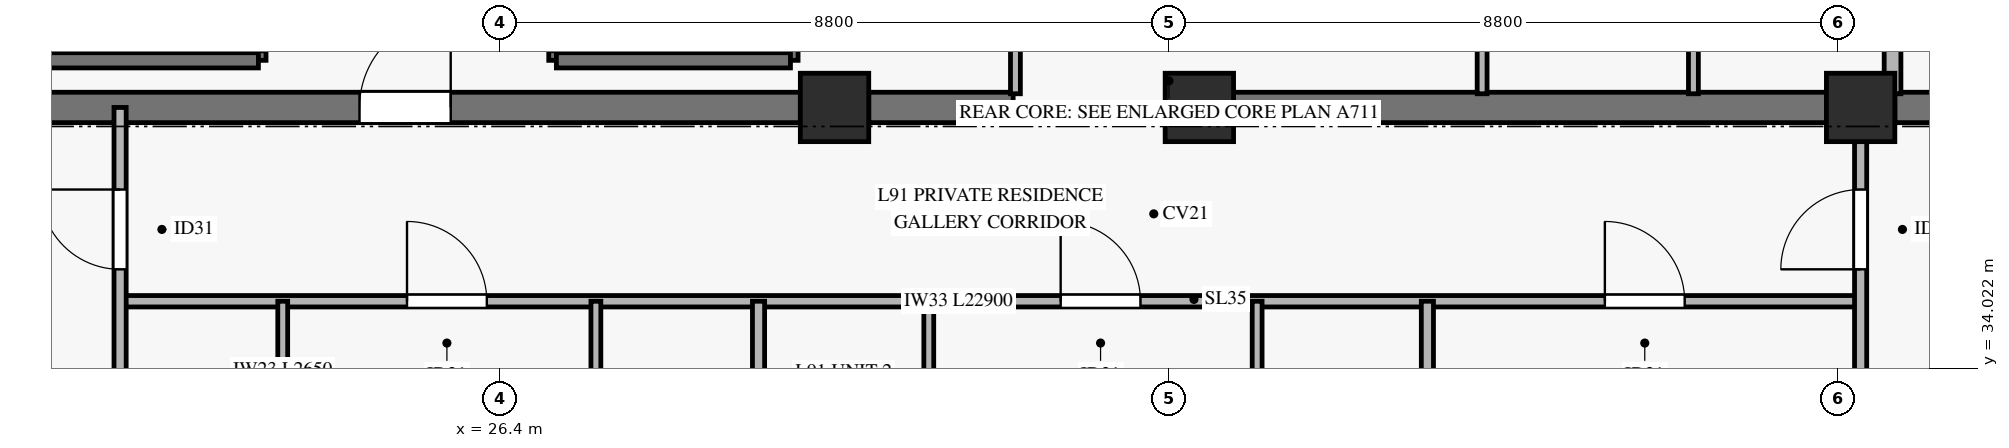
"""IFC4 building model, lengths in metres.
Left out: names, types, materials, properties, quantities, classifications, styles, units other than length and angle.
Written with IfcOpenShell. Run it as: python <this file> out.ifc"""

import sys

from ifc_helpers import new_model, si_unit, direction, frame, frame_2d, origin, origin_2d, place, context, subcontext, project, spatial, rectangle, extrude, source, transform, mapped, element, fill, save


model = new_model("IFC4")
c1 = context("Model", 3, precision=1e-05, world=origin(), true_north=direction((0.0, 1.0)))
c2 = subcontext(c1, "Body", "Model", "MODEL_VIEW")
j1 = project(units=[si_unit("LENGTHUNIT", "METRE"), si_unit("PLANEANGLEUNIT", "RADIAN")], contexts=[c1])
p1 = place(None, origin())
s1 = spatial("IfcSite", under=j1, at=p1, CompositionType="ELEMENT")
p2 = place(p1, origin())
s2 = spatial("IfcBuilding", under=s1, at=p2, CompositionType="ELEMENT")
p3 = place(p2, frame((0.0, 0.0, 349.3)))
s3 = spatial("IfcBuildingStorey", under=s2, at=p3, CompositionType="ELEMENT", Elevation=349.3)
m1 = source(origin(), c2, "Body", "SweptSolid", [
    extrude(rectangle(XDim=0.9, YDim=0.9, at=origin_2d()), origin(), (0.0, 0.0, 1.0), 3.08),
])
for number, where, z_axis, x_axis in (
    (1, (30.8, 37.45, 0.0), (0.0, 0.0, 1.0), (1.0, 0.0, 0.0)),
    (2, (35.6, 37.45, 0.0), (0.0, 0.0, 1.0), (1.0, 0.0, 0.0)),
    (3, (44.3, 37.45, 0.0), (0.0, 0.0, 1.0), (1.0, 0.0, 0.0)),
):
    element("IfcColumn", number, at=place(p3, frame(where, z_axis=z_axis, x_axis=x_axis)), inside=s3, PredefinedType="PILASTER", context=c2, shape_type="MappedRepresentation", body=[
        mapped(m1, transform((0.0, 0.0, 0.0), x_axis=(1.0, 0.0, 0.0), y_axis=(0.0, 1.0, 0.0), z_axis=(0.0, 0.0, 1.0), scale=1.0)),
    ])
p4 = place(p3, frame((20.3, 37.45, 0.0), z_axis=(0.0, 0.0, 1.0), x_axis=(1.0, 0.0, 0.0)))
e4 = element("IfcWall", 4, at=p4, inside=s3, PredefinedType="SHEAR", context=c2, shape_type="SweptSolid", body=[
    extrude(rectangle(XDim=10.05, YDim=0.4, at=frame_2d((5.025, 0.0))), origin(), (0.0, 0.0, 1.0), 3.08),
])
p5 = place(p4, frame((4.25, 0.0, 0.0)))
e5 = element("IfcOpeningElement", 5, at=p5, cuts=e4, PredefinedType="OPENING", context=c2, shape_type="SweptSolid", body=[
    extrude(rectangle(XDim=1.2, YDim=2.15, at=frame_2d((0.6, 1.075))), frame((0.0, 0.21, 0.0), z_axis=(0.0, -1.0, 0.0), x_axis=(1.0, 0.0, 0.0)), (0.0, 0.0, 1.0), 0.42),
])
p6 = place(p3, frame((31.25, 37.45, 0.0), z_axis=(0.0, 0.0, 1.0), x_axis=(1.0, 0.0, 0.0)))
e6 = element("IfcWall", 6, at=p6, inside=s3, PredefinedType="SHEAR", context=c2, shape_type="SweptSolid", body=[
    extrude(rectangle(XDim=1.9, YDim=0.4, at=frame_2d((0.95, 0.0))), origin(), (0.0, 0.0, 1.0), 3.08),
])
p7 = place(p3, frame((36.05, 37.45, 0.0), z_axis=(0.0, 0.0, 1.0), x_axis=(1.0, 0.0, 0.0)))
e7 = element("IfcWall", 7, at=p7, inside=s3, PredefinedType="SHEAR", context=c2, shape_type="SweptSolid", body=[
    extrude(rectangle(XDim=7.8, YDim=0.4, at=frame_2d((3.9, 0.0))), origin(), (0.0, 0.0, 1.0), 3.08),
])
p8 = place(p3, frame((44.75, 37.45, 0.0), z_axis=(0.0, 0.0, 1.0), x_axis=(1.0, 0.0, 0.0)))
e8 = element("IfcWall", 8, at=p8, inside=s3, PredefinedType="SHEAR", context=c2, shape_type="SweptSolid", body=[
    extrude(rectangle(XDim=5.35, YDim=0.4, at=frame_2d((2.675, 0.0))), origin(), (0.0, 0.0, 1.0), 3.08),
])
p9 = place(p8, frame((0.7, 0.0, 0.0)))
e9 = element("IfcOpeningElement", 9, at=p9, cuts=e8, PredefinedType="OPENING", context=c2, shape_type="SweptSolid", body=[
    extrude(rectangle(XDim=1.2, YDim=2.15, at=frame_2d((0.6, 1.075))), frame((0.0, 0.21, 0.0), z_axis=(0.0, -1.0, 0.0), x_axis=(1.0, 0.0, 0.0)), (0.0, 0.0, 1.0), 0.42),
])
p10 = place(p3, frame((23.22, 38.07, 0.0), z_axis=(0.0, 0.0, 1.0), x_axis=(0.0, 1.0, 0.0)))
e10 = element("IfcWall", 10, at=p10, inside=s3, PredefinedType="SOLIDWALL", context=c2, shape_type="SweptSolid", body=[
    extrude(rectangle(XDim=7.25, YDim=0.2, at=frame_2d((3.625, 0.0))), origin(), (0.0, 0.0, 1.0), 3.4),
])
p11 = place(p10, frame((0.11, 0.0, 0.0)))
e11 = element("IfcOpeningElement", 11, at=p11, cuts=e10, PredefinedType="OPENING", context=c2, shape_type="SweptSolid", body=[
    extrude(rectangle(XDim=1.1, YDim=2.15, at=frame_2d((0.55, 1.075))), frame((0.0, 0.11, 0.0), z_axis=(0.0, -1.0, 0.0), x_axis=(1.0, 0.0, 0.0)), (0.0, 0.0, 1.0), 0.22),
])
p12 = place(p3, frame((20.17, 38.07, 0.0), z_axis=(0.0, 0.0, 1.0), x_axis=(1.0, 0.0, 0.0)))
e12 = element("IfcWall", 12, at=p12, inside=s3, PredefinedType="SOLIDWALL", context=c2, shape_type="SweptSolid", body=[
    extrude(rectangle(XDim=3.05, YDim=0.2, at=frame_2d((1.525, 0.0))), origin(), (0.0, 0.0, 1.0), 3.4),
])
p13 = place(p3, frame((27.14, 38.07, 0.0), z_axis=(0.0, 0.0, 1.0), x_axis=(0.0, 1.0, 0.0)))
e13 = element("IfcWall", 13, at=p13, inside=s3, PredefinedType="SOLIDWALL", context=c2, shape_type="SweptSolid", body=[
    extrude(rectangle(XDim=7.25, YDim=0.2, at=frame_2d((3.625, 0.0))), origin(), (0.0, 0.0, 1.0), 3.4),
])
p14 = place(p13, frame((0.11, 0.0, 0.0)))
e14 = element("IfcOpeningElement", 14, at=p14, cuts=e13, PredefinedType="OPENING", context=c2, shape_type="SweptSolid", body=[
    extrude(rectangle(XDim=1.1, YDim=2.15, at=frame_2d((0.55, 1.075))), frame((0.0, 0.11, 0.0), z_axis=(0.0, -1.0, 0.0), x_axis=(1.0, 0.0, 0.0)), (0.0, 0.0, 1.0), 0.22),
])
p15 = place(p3, frame((30.22, 38.07, 0.0), z_axis=(0.0, 0.0, 1.0), x_axis=(0.0, 1.0, 0.0)))
e15 = element("IfcWall", 15, at=p15, inside=s3, PredefinedType="SOLIDWALL", context=c2, shape_type="SweptSolid", body=[
    extrude(rectangle(XDim=7.25, YDim=0.2, at=frame_2d((3.625, 0.0))), origin(), (0.0, 0.0, 1.0), 3.4),
])
p16 = place(p3, frame((27.14, 38.07, 0.0), z_axis=(0.0, 0.0, 1.0), x_axis=(1.0, 0.0, 0.0)))
e16 = element("IfcWall", 16, at=p16, inside=s3, PredefinedType="SOLIDWALL", context=c2, shape_type="SweptSolid", body=[
    extrude(rectangle(XDim=3.08, YDim=0.2, at=frame_2d((1.54, 0.0))), origin(), (0.0, 0.0, 1.0), 3.4),
])
p17 = place(p3, frame((44.72, 37.63, 0.0), z_axis=(0.0, 0.0, 1.0), x_axis=(0.0, 1.0, 0.0)))
e17 = element("IfcWall", 17, at=p17, inside=s3, PredefinedType="SOLIDWALL", context=c2, shape_type="SweptSolid", body=[
    extrude(rectangle(XDim=7.59, YDim=0.22, at=frame_2d((3.795, 0.0))), origin(), (0.0, 0.0, 1.0), 3.08),
])
p18 = place(p3, frame((33.18, 37.63, 0.0), z_axis=(0.0, 0.0, 1.0), x_axis=(0.0, 1.0, 0.0)))
e18 = element("IfcWall", 18, at=p18, inside=s3, PredefinedType="PARTITIONING", context=c2, shape_type="SweptSolid", body=[
    extrude(rectangle(XDim=6.52, YDim=0.13, at=frame_2d((3.26, 0.0))), origin(), (0.0, 0.0, 1.0), 2.22),
])
p19 = place(p18, frame((0.97, 0.0, 0.0)))
e19 = element("IfcOpeningElement", 19, at=p19, cuts=e18, PredefinedType="OPENING", context=c2, shape_type="SweptSolid", body=[
    extrude(rectangle(XDim=0.9, YDim=2.1, at=frame_2d((0.45, 1.05))), frame((0.0, 0.075, 0.0), z_axis=(0.0, -1.0, 0.0), x_axis=(1.0, 0.0, 0.0)), (0.0, 0.0, 1.0), 0.15),
])
p20 = place(p18, frame((3.87, 0.0, 0.0)))
e20 = element("IfcOpeningElement", 20, at=p20, cuts=e18, PredefinedType="OPENING", context=c2, shape_type="SweptSolid", body=[
    extrude(rectangle(XDim=0.9, YDim=2.1, at=frame_2d((0.45, 1.05))), frame((0.0, 0.075, 0.0), z_axis=(0.0, -1.0, 0.0), x_axis=(1.0, 0.0, 0.0)), (0.0, 0.0, 1.0), 0.15),
])
p21 = place(p3, frame((39.32, 37.63, 0.0), z_axis=(0.0, 0.0, 1.0), x_axis=(0.0, 1.0, 0.0)))
e21 = element("IfcWall", 21, at=p21, inside=s3, PredefinedType="PARTITIONING", context=c2, shape_type="SweptSolid", body=[
    extrude(rectangle(XDim=8.74, YDim=0.13, at=frame_2d((4.37, 0.0))), origin(), (0.0, 0.0, 1.0), 3.08),
])
p22 = place(p21, frame((4.89, 0.0, 0.0)))
e22 = element("IfcOpeningElement", 22, at=p22, cuts=e21, PredefinedType="OPENING", context=c2, shape_type="SweptSolid", body=[
    extrude(rectangle(XDim=0.9, YDim=2.1, at=frame_2d((0.45, 1.05))), frame((0.0, 0.075, 0.0), z_axis=(0.0, -1.0, 0.0), x_axis=(1.0, 0.0, 0.0)), (0.0, 0.0, 1.0), 0.15),
])
p23 = place(p3, frame((42.1, 37.63, 0.0), z_axis=(0.0, 0.0, 1.0), x_axis=(0.0, 1.0, 0.0)))
e23 = element("IfcWall", 23, at=p23, inside=s3, PredefinedType="PARTITIONING", context=c2, shape_type="SweptSolid", body=[
    extrude(rectangle(XDim=8.74, YDim=0.13, at=frame_2d((4.37, 0.0))), origin(), (0.0, 0.0, 1.0), 3.08),
])
p24 = place(p23, frame((2.17, 0.0, 0.0)))
e24 = element("IfcOpeningElement", 24, at=p24, cuts=e23, PredefinedType="OPENING", context=c2, shape_type="SweptSolid", body=[
    extrude(rectangle(XDim=0.9, YDim=2.1, at=frame_2d((0.45, 1.05))), frame((0.0, 0.075, 0.0), z_axis=(0.0, -1.0, 0.0), x_axis=(1.0, 0.0, 0.0)), (0.0, 0.0, 1.0), 0.15),
])
p25 = place(p3, frame((21.4, 34.9, 0.0), z_axis=(0.0, 0.0, 1.0), x_axis=(1.0, 0.0, 0.0)))
e25 = element("IfcWall", 25, at=p25, inside=s3, PredefinedType="PARTITIONING", context=c2, shape_type="SweptSolid", body=[
    extrude(rectangle(XDim=22.9, YDim=0.15, at=frame_2d((11.45, 0.0))), origin(), (0.0, 0.0, 1.0), 2.365),
])
p26 = place(p25, frame((3.775, 0.0, 0.0)))
e26 = element("IfcOpeningElement", 26, at=p26, cuts=e25, PredefinedType="OPENING", context=c2, shape_type="SweptSolid", body=[
    extrude(rectangle(XDim=1.05, YDim=2.15, at=frame_2d((0.525, 1.075))), frame((0.0, 0.085, 0.0), z_axis=(0.0, -1.0, 0.0), x_axis=(1.0, 0.0, 0.0)), (0.0, 0.0, 1.0), 0.17),
])
p27 = place(p25, frame((12.375, 0.0, 0.0)))
e27 = element("IfcOpeningElement", 27, at=p27, cuts=e25, PredefinedType="OPENING", context=c2, shape_type="SweptSolid", body=[
    extrude(rectangle(XDim=1.05, YDim=2.15, at=frame_2d((0.525, 1.075))), frame((0.0, 0.085, 0.0), z_axis=(0.0, -1.0, 0.0), x_axis=(1.0, 0.0, 0.0)), (0.0, 0.0, 1.0), 0.17),
])
p28 = place(p25, frame((19.535, 0.0, 0.0)))
e28 = element("IfcOpeningElement", 28, at=p28, cuts=e25, PredefinedType="OPENING", context=c2, shape_type="SweptSolid", body=[
    extrude(rectangle(XDim=1.05, YDim=2.15, at=frame_2d((0.525, 1.075))), frame((0.0, 0.085, 0.0), z_axis=(0.0, -1.0, 0.0), x_axis=(1.0, 0.0, 0.0)), (0.0, 0.0, 1.0), 0.17),
])
p29 = place(p3, frame((21.4, 23.5, 0.0), z_axis=(0.0, 0.0, 1.0), x_axis=(0.0, 1.0, 0.0)))
e29 = element("IfcWall", 29, at=p29, inside=s3, PredefinedType="PARTITIONING", context=c2, shape_type="SweptSolid", body=[
    extrude(rectangle(XDim=13.95, YDim=0.16, at=frame_2d((6.975, 0.0))), origin(), (0.0, 0.0, 1.0), 2.665),
])
p30 = place(p29, frame((11.82, 0.0, 0.0)))
e30 = element("IfcOpeningElement", 30, at=p30, cuts=e29, PredefinedType="OPENING", context=c2, shape_type="SweptSolid", body=[
    extrude(rectangle(XDim=1.05, YDim=2.15, at=frame_2d((0.525, 1.075))), frame((0.0, 0.09, 0.0), z_axis=(0.0, -1.0, 0.0), x_axis=(1.0, 0.0, 0.0)), (0.0, 0.0, 1.0), 0.18),
])
for number, where, z_axis, x_axis in (
    (31, (29.8, 23.5, 0.0), (0.0, 0.0, 1.0), (0.0, 1.0, 0.0)),
    (32, (38.6, 23.5, 0.0), (0.0, 0.0, 1.0), (0.0, 1.0, 0.0)),
):
    element("IfcWall", number, at=place(p3, frame(where, z_axis=z_axis, x_axis=x_axis)), inside=s3, PredefinedType="PARTITIONING", context=c2, shape_type="SweptSolid", body=[
        extrude(rectangle(XDim=11.4, YDim=0.16, at=frame_2d((5.7, 0.0))), origin(), (0.0, 0.0, 1.0), 2.665),
    ])
p31 = place(p3, frame((44.3, 23.5, 0.0), z_axis=(0.0, 0.0, 1.0), x_axis=(0.0, 1.0, 0.0)))
e33 = element("IfcWall", 33, at=p31, inside=s3, PredefinedType="PARTITIONING", context=c2, shape_type="SweptSolid", body=[
    extrude(rectangle(XDim=13.95, YDim=0.16, at=frame_2d((6.975, 0.0))), origin(), (0.0, 0.0, 1.0), 2.365),
])
p32 = place(p31, frame((11.82, 0.0, 0.0)))
e34 = element("IfcOpeningElement", 34, at=p32, cuts=e33, PredefinedType="OPENING", context=c2, shape_type="SweptSolid", body=[
    extrude(rectangle(XDim=1.05, YDim=2.15, at=frame_2d((0.525, 1.075))), frame((0.0, 0.09, 0.0), z_axis=(0.0, -1.0, 0.0), x_axis=(1.0, 0.0, 0.0)), (0.0, 0.0, 1.0), 0.18),
])
p33 = place(p3, frame((23.54, 32.25, 0.0), z_axis=(0.0, 0.0, 1.0), x_axis=(0.0, 1.0, 0.0)))
e35 = element("IfcWall", 35, at=p33, inside=s3, PredefinedType="PARTITIONING", context=c2, shape_type="SweptSolid", body=[
    extrude(rectangle(XDim=2.65, YDim=0.13, at=frame_2d((1.325, 0.0))), origin(), (0.0, 0.0, 1.0), 2.665),
])
p34 = place(p3, frame((27.66, 32.25, 0.0), z_axis=(0.0, 0.0, 1.0), x_axis=(0.0, 1.0, 0.0)))
e36 = element("IfcWall", 36, at=p34, inside=s3, PredefinedType="PARTITIONING", context=c2, shape_type="SweptSolid", body=[
    extrude(rectangle(XDim=2.65, YDim=0.13, at=frame_2d((1.325, 0.0))), origin(), (0.0, 0.0, 1.0), 2.665),
])
p35 = place(p34, frame((0.67, 0.0, 0.0)))
e37 = element("IfcOpeningElement", 37, at=p35, cuts=e36, PredefinedType="OPENING", context=c2, shape_type="SweptSolid", body=[
    extrude(rectangle(XDim=0.9, YDim=2.1, at=frame_2d((0.45, 1.05))), frame((0.0, 0.075, 0.0), z_axis=(0.0, -1.0, 0.0), x_axis=(1.0, 0.0, 0.0)), (0.0, 0.0, 1.0), 0.15),
])
p36 = place(p3, frame((32.04, 32.25, 0.0), z_axis=(0.0, 0.0, 1.0), x_axis=(0.0, 1.0, 0.0)))
e38 = element("IfcWall", 38, at=p36, inside=s3, PredefinedType="PARTITIONING", context=c2, shape_type="SweptSolid", body=[
    extrude(rectangle(XDim=2.65, YDim=0.13, at=frame_2d((1.325, 0.0))), origin(), (0.0, 0.0, 1.0), 2.665),
])
p37 = place(p3, frame((36.36, 32.25, 0.0), z_axis=(0.0, 0.0, 1.0), x_axis=(0.0, 1.0, 0.0)))
e39 = element("IfcWall", 39, at=p37, inside=s3, PredefinedType="PARTITIONING", context=c2, shape_type="SweptSolid", body=[
    extrude(rectangle(XDim=2.65, YDim=0.13, at=frame_2d((1.325, 0.0))), origin(), (0.0, 0.0, 1.0), 2.665),
])
p38 = place(p37, frame((0.67, 0.0, 0.0)))
e40 = element("IfcOpeningElement", 40, at=p38, cuts=e39, PredefinedType="OPENING", context=c2, shape_type="SweptSolid", body=[
    extrude(rectangle(XDim=0.9, YDim=2.1, at=frame_2d((0.45, 1.05))), frame((0.0, 0.075, 0.0), z_axis=(0.0, -1.0, 0.0), x_axis=(1.0, 0.0, 0.0)), (0.0, 0.0, 1.0), 0.15),
])
m2 = source(origin(), c2, "Body", "SweptSolid", [
    extrude(rectangle(XDim=1.2, YDim=2.15, at=frame_2d((0.6, 1.075))), frame((0.0, 0.025, 0.0), z_axis=(0.0, -1.0, 0.0), x_axis=(1.0, 0.0, 0.0)), (0.0, 0.0, 1.0), 0.05),
])
p39 = place(p5, origin())
e41 = element("IfcDoor", 41, at=p39, inside=s3, OperationType="SINGLE_SWING_RIGHT", PredefinedType="DOOR", context=c2, shape_type="MappedRepresentation", body=[
    mapped(m2, transform((0.0, 0.0, 0.0), x_axis=(1.0, 0.0, 0.0), y_axis=(0.0, 1.0, 0.0), z_axis=(0.0, 0.0, 1.0), scale=1.0)),
])
fill(e5, e41)
m3 = source(origin(), c2, "Body", "SweptSolid", [
    extrude(rectangle(XDim=1.05, YDim=2.15, at=frame_2d((0.525, 1.075))), frame((0.0, 0.025, 0.0), z_axis=(0.0, -1.0, 0.0), x_axis=(1.0, 0.0, 0.0)), (0.0, 0.0, 1.0), 0.05),
])
p40 = place(p30, origin())
e42 = element("IfcDoor", 42, at=p40, inside=s3, OperationType="SINGLE_SWING_RIGHT", PredefinedType="DOOR", context=c2, shape_type="MappedRepresentation", body=[
    mapped(m3, transform((0.0, 0.0, 0.0), x_axis=(1.0, 0.0, 0.0), y_axis=(0.0, 1.0, 0.0), z_axis=(0.0, 0.0, 1.0), scale=1.0)),
])
fill(e30, e42)
p41 = place(p26, origin())
e43 = element("IfcDoor", 43, at=p41, inside=s3, OperationType="SINGLE_SWING_LEFT", PredefinedType="DOOR", context=c2, shape_type="MappedRepresentation", body=[
    mapped(m3, transform((0.0, 0.0, 0.0), x_axis=(1.0, 0.0, 0.0), y_axis=(0.0, 1.0, 0.0), z_axis=(0.0, 0.0, 1.0), scale=1.0)),
])
fill(e26, e43)
p42 = place(p27, origin())
e44 = element("IfcDoor", 44, at=p42, inside=s3, OperationType="SINGLE_SWING_LEFT", PredefinedType="DOOR", context=c2, shape_type="MappedRepresentation", body=[
    mapped(m3, transform((0.0, 0.0, 0.0), x_axis=(1.0, 0.0, 0.0), y_axis=(0.0, 1.0, 0.0), z_axis=(0.0, 0.0, 1.0), scale=1.0)),
])
fill(e27, e44)
p43 = place(p28, origin())
e45 = element("IfcDoor", 45, at=p43, inside=s3, OperationType="SINGLE_SWING_LEFT", PredefinedType="DOOR", context=c2, shape_type="MappedRepresentation", body=[
    mapped(m3, transform((0.0, 0.0, 0.0), x_axis=(1.0, 0.0, 0.0), y_axis=(0.0, 1.0, 0.0), z_axis=(0.0, 0.0, 1.0), scale=1.0)),
])
fill(e28, e45)
p44 = place(p32, origin())
e46 = element("IfcDoor", 46, at=p44, inside=s3, OperationType="SINGLE_SWING_LEFT", PredefinedType="DOOR", context=c2, shape_type="MappedRepresentation", body=[
    mapped(m3, transform((0.0, 0.0, 0.0), x_axis=(1.0, 0.0, 0.0), y_axis=(0.0, 1.0, 0.0), z_axis=(0.0, 0.0, 1.0), scale=1.0)),
])
fill(e34, e46)
save(model, sys.argv[1])
